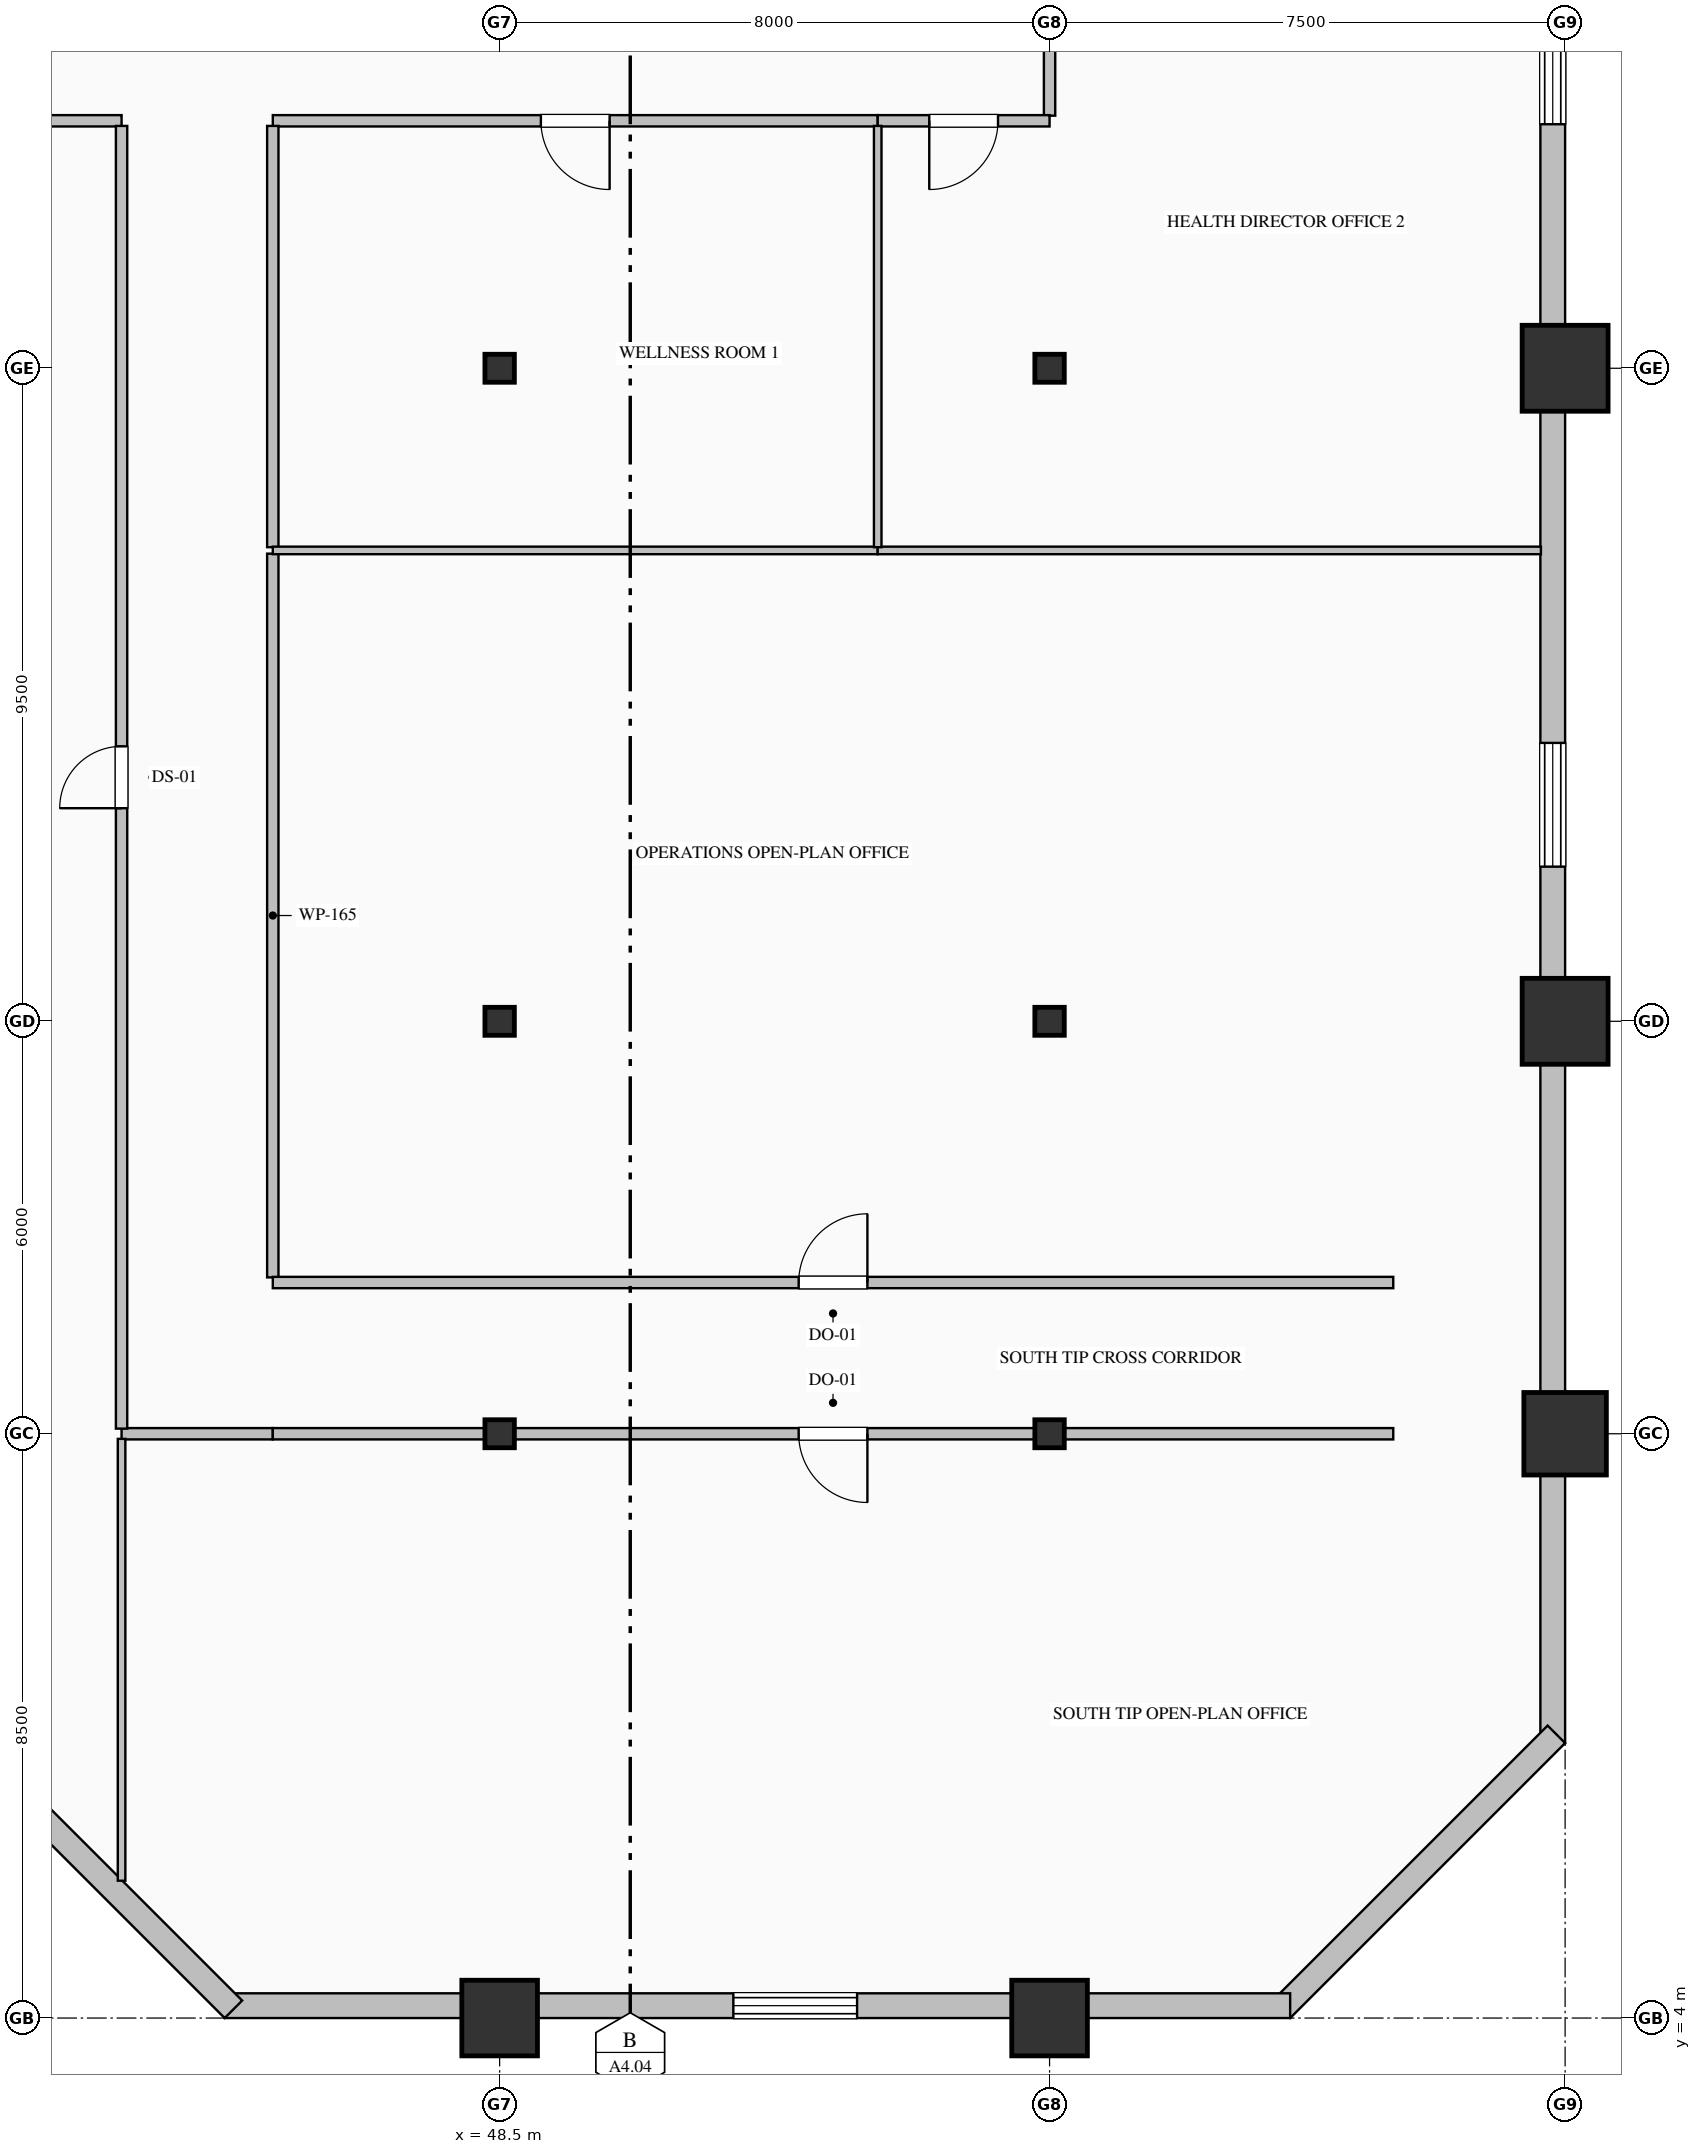
"""IFC4 building model, lengths in metres.
Left out: names, types, materials, properties, quantities, classifications, styles, units other than length and angle.
Written with IfcOpenShell. Run it as: python <this file> out.ifc"""

import sys

from ifc_helpers import new_model, si_unit, direction, frame, frame_2d, origin, origin_2d, place, context, subcontext, project, spatial, rectangle, hollow_rectangle, hollow_circle, i_section, extrude, element, fill, save


model = new_model("IFC4")
c1 = context("Model", 3, precision=1e-05, world=origin(), true_north=direction((0.0, 1.0)))
c2 = subcontext(c1, "Body", "Model", "MODEL_VIEW")
j1 = project(units=[si_unit("LENGTHUNIT", "METRE"), si_unit("PLANEANGLEUNIT", "RADIAN")], contexts=[c1])
p1 = place(None, origin())
s1 = spatial("IfcSite", under=j1, at=p1, CompositionType="ELEMENT")
p2 = place(p1, origin())
s2 = spatial("IfcBuilding", under=s1, at=p2, CompositionType="ELEMENT")
p3 = place(p2, frame((0.0, 0.0, 88.2)))
s3 = spatial("IfcBuildingStorey", under=s2, at=p3, CompositionType="ELEMENT", Elevation=88.2)
p4 = place(p3, frame((48.5, 4.0, 0.0), z_axis=(0.0, 0.0, 1.0), x_axis=(1.0, 0.0, 0.0)))
e1 = element("IfcColumn", 1, at=p4, inside=s3, PredefinedType="COLUMN", context=c2, shape_type="SweptSolid", body=[
    extrude(hollow_rectangle(XDim=1.1, YDim=1.1, WallThickness=0.04, at=origin_2d()), origin(), (0.0, 0.0, 1.0), 4.0),
])
for number, where, z_axis, x_axis in (
    (2, (48.5, 12.5, 0.0), (0.0, 0.0, 1.0), (1.0, 0.0, 0.0)),
    (3, (48.5, 18.5, 0.0), (0.0, 0.0, 1.0), (1.0, 0.0, 0.0)),
    (4, (48.5, 28.0, 0.0), (0.0, 0.0, 1.0), (1.0, 0.0, 0.0)),
):
    element("IfcColumn", number, at=place(p3, frame(where, z_axis=z_axis, x_axis=x_axis)), inside=s3, PredefinedType="COLUMN", context=c2, shape_type="SweptSolid", body=[
        extrude(i_section(OverallWidth=0.407, OverallDepth=0.428, WebThickness=0.02, FlangeThickness=0.035, FilletRadius=0.022, at=origin_2d()), origin(), (0.0, 0.0, 1.0), 4.0),
    ])
p5 = place(p3, frame((56.5, 4.0, 0.0), z_axis=(0.0, 0.0, 1.0), x_axis=(1.0, 0.0, 0.0)))
e5 = element("IfcColumn", 5, at=p5, inside=s3, PredefinedType="COLUMN", context=c2, shape_type="SweptSolid", body=[
    extrude(hollow_rectangle(XDim=1.1, YDim=1.1, WallThickness=0.04, at=origin_2d()), origin(), (0.0, 0.0, 1.0), 4.0),
])
for number, where, z_axis, x_axis in (
    (6, (56.5, 12.5, 0.0), (0.0, 0.0, 1.0), (1.0, 0.0, 0.0)),
    (7, (56.5, 18.5, 0.0), (0.0, 0.0, 1.0), (1.0, 0.0, 0.0)),
    (8, (56.5, 28.0, 0.0), (0.0, 0.0, 1.0), (1.0, 0.0, 0.0)),
):
    element("IfcColumn", number, at=place(p3, frame(where, z_axis=z_axis, x_axis=x_axis)), inside=s3, PredefinedType="COLUMN", context=c2, shape_type="SweptSolid", body=[
        extrude(i_section(OverallWidth=0.407, OverallDepth=0.428, WebThickness=0.02, FlangeThickness=0.035, FilletRadius=0.022, at=origin_2d()), origin(), (0.0, 0.0, 1.0), 4.0),
    ])
p6 = place(p3, frame((64.0, 12.5, 0.0), z_axis=(0.0, 0.0, 1.0), x_axis=(1.0, 0.0, 0.0)))
e9 = element("IfcColumn", 9, at=p6, inside=s3, PredefinedType="COLUMN", context=c2, shape_type="SweptSolid", body=[
    extrude(hollow_circle(Radius=0.6, WallThickness=0.04, at=origin_2d()), origin(), (0.0, 0.0, 1.0), 4.0),
])
for number, where, z_axis, x_axis in (
    (10, (64.0, 18.5, 0.0), (0.0, 0.0, 1.0), (1.0, 0.0, 0.0)),
    (11, (64.0, 28.0, 0.0), (0.0, 0.0, 1.0), (1.0, 0.0, 0.0)),
):
    element("IfcColumn", number, at=place(p3, frame(where, z_axis=z_axis, x_axis=x_axis)), inside=s3, PredefinedType="COLUMN", context=c2, shape_type="SweptSolid", body=[
        extrude(hollow_rectangle(XDim=1.25, YDim=1.25, WallThickness=0.045, at=origin_2d()), origin(), (0.0, 0.0, 1.0), 4.0),
    ])
p7 = place(p3, frame((63.82, 36.05, 0.0), z_axis=(0.0, 0.0, 1.0), x_axis=(0.0, -1.0, 0.0)))
e12 = element("IfcWall", 12, at=p7, inside=s3, PredefinedType="SOLIDWALL", context=c2, shape_type="SweptSolid", body=[
    extrude(rectangle(XDim=28.05, YDim=0.36, at=frame_2d((14.025, 0.0))), origin(), (0.0, 0.0, 1.0), 3.25),
])
p8 = place(p7, frame((2.7, 0.0, 0.85)))
e13 = element("IfcOpeningElement", 13, at=p8, cuts=e12, PredefinedType="OPENING", context=c2, shape_type="SweptSolid", body=[
    extrude(rectangle(XDim=1.8, YDim=2.05, at=frame_2d((0.9, 1.025))), frame((0.0, 0.19, 0.0), z_axis=(0.0, -1.0, 0.0), x_axis=(1.0, 0.0, 0.0)), (0.0, 0.0, 1.0), 0.38),
])
p9 = place(p7, frame((13.5, 0.0, 0.85)))
e14 = element("IfcOpeningElement", 14, at=p9, cuts=e12, PredefinedType="OPENING", context=c2, shape_type="SweptSolid", body=[
    extrude(rectangle(XDim=1.8, YDim=2.05, at=frame_2d((0.9, 1.025))), frame((0.0, 0.19, 0.0), z_axis=(0.0, -1.0, 0.0), x_axis=(1.0, 0.0, 0.0)), (0.0, 0.0, 1.0), 0.38),
])
p10 = place(p3, frame((63.873, 8.127, 0.0), z_axis=(0.0, 0.0, 1.0), x_axis=(-0.707106781187, -0.707106781187, 0.0)))
e15 = element("IfcWall", 15, at=p10, inside=s3, PredefinedType="SOLIDWALL", context=c2, shape_type="SweptSolid", body=[
    extrude(rectangle(XDim=5.657, YDim=0.36, at=frame_2d((2.828, 0.0))), origin(), (0.0, 0.0, 1.0), 3.75),
])
p11 = place(p3, frame((60.0, 4.18, 0.0), z_axis=(0.0, 0.0, 1.0), x_axis=(-1.0, 0.0, 0.0)))
e16 = element("IfcWall", 16, at=p11, inside=s3, PredefinedType="SOLIDWALL", context=c2, shape_type="SweptSolid", body=[
    extrude(rectangle(XDim=15.5, YDim=0.36, at=frame_2d((7.75, 0.0))), origin(), (0.0, 0.0, 1.0), 3.25),
])
p12 = place(p11, frame((6.3, 0.0, 0.85)))
e17 = element("IfcOpeningElement", 17, at=p12, cuts=e16, PredefinedType="OPENING", context=c2, shape_type="SweptSolid", body=[
    extrude(rectangle(XDim=1.8, YDim=2.05, at=frame_2d((0.9, 1.025))), frame((0.0, 0.19, 0.0), z_axis=(0.0, -1.0, 0.0), x_axis=(1.0, 0.0, 0.0)), (0.0, 0.0, 1.0), 0.38),
])
p13 = place(p3, frame((44.627, 4.127, 0.0), z_axis=(0.0, 0.0, 1.0), x_axis=(-0.707106781187, 0.707106781187, 0.0)))
e18 = element("IfcWall", 18, at=p13, inside=s3, PredefinedType="SOLIDWALL", context=c2, shape_type="SweptSolid", body=[
    extrude(rectangle(XDim=5.657, YDim=0.36, at=frame_2d((2.828, 0.0))), origin(), (0.0, 0.0, 1.0), 3.75),
])
p14 = place(p3, frame((54.0, 31.6, 0.0), z_axis=(0.0, 0.0, 1.0), x_axis=(-1.0, 0.0, 0.0)))
e19 = element("IfcWall", 19, at=p14, inside=s3, PredefinedType="PARTITIONING", context=c2, shape_type="SweptSolid", body=[
    extrude(rectangle(XDim=8.8, YDim=0.165, at=frame_2d((4.4, 0.0))), origin(), (0.0, 0.0, 1.0), 3.75),
])
p15 = place(p14, frame((3.9, 0.0, 0.0)))
e20 = element("IfcOpeningElement", 20, at=p15, cuts=e19, PredefinedType="OPENING", context=c2, shape_type="SweptSolid", body=[
    extrude(rectangle(XDim=1.0, YDim=2.15, at=frame_2d((0.5, 1.075))), frame((0.0, 0.093, 0.0), z_axis=(0.0, -1.0, 0.0), x_axis=(1.0, 0.0, 0.0)), (0.0, 0.0, 1.0), 0.185),
])
p16 = place(p3, frame((56.5, 33.726, 0.0), z_axis=(0.0, 0.0, 1.0), x_axis=(0.0, -1.0, 0.0)))
e21 = element("IfcWall", 21, at=p16, inside=s3, PredefinedType="PARTITIONING", context=c2, shape_type="SweptSolid", body=[
    extrude(rectangle(XDim=2.051, YDim=0.165, at=frame_2d((1.025, 0.0))), origin(), (0.0, 0.0, 1.0), 3.042),
])
p17 = place(p3, frame((56.5, 31.6, 0.0), z_axis=(0.0, 0.0, 1.0), x_axis=(-1.0, 0.0, 0.0)))
e22 = element("IfcWall", 22, at=p17, inside=s3, PredefinedType="PARTITIONING", context=c2, shape_type="SweptSolid", body=[
    extrude(rectangle(XDim=2.5, YDim=0.165, at=frame_2d((1.25, 0.0))), origin(), (0.0, 0.0, 1.0), 3.75),
])
p18 = place(p17, frame((0.75, 0.0, 0.0)))
e23 = element("IfcOpeningElement", 23, at=p18, cuts=e22, PredefinedType="OPENING", context=c2, shape_type="SweptSolid", body=[
    extrude(rectangle(XDim=1.0, YDim=2.15, at=frame_2d((0.5, 1.075))), frame((0.0, 0.093, 0.0), z_axis=(0.0, -1.0, 0.0), x_axis=(1.0, 0.0, 0.0)), (0.0, 0.0, 1.0), 0.185),
])
p19 = place(p3, frame((43.0, 31.6, 0.0), z_axis=(0.0, 0.0, 1.0), x_axis=(-1.0, 0.0, 0.0)))
e24 = element("IfcWall", 24, at=p19, inside=s3, PredefinedType="PARTITIONING", context=c2, shape_type="SweptSolid", body=[
    extrude(rectangle(XDim=2.5, YDim=0.165, at=frame_2d((1.25, 0.0))), origin(), (0.0, 0.0, 1.0), 3.75),
])
p20 = place(p3, frame((45.2, 12.5, 0.0), z_axis=(0.0, 0.0, 1.0), x_axis=(-1.0, 0.0, 0.0)))
e25 = element("IfcWall", 25, at=p20, inside=s3, PredefinedType="PARTITIONING", context=c2, shape_type="SweptSolid", body=[
    extrude(rectangle(XDim=2.2, YDim=0.165, at=frame_2d((1.1, 0.0))), origin(), (0.0, 0.0, 1.0), 3.042),
])
p21 = place(p3, frame((45.2, 25.303, 0.0), z_axis=(0.0, 0.0, 1.0), x_axis=(0.0, -1.0, 0.0)))
e26 = element("IfcWall", 26, at=p21, inside=s3, PredefinedType="PARTITIONING", context=c2, shape_type="SweptSolid", body=[
    extrude(rectangle(XDim=10.529, YDim=0.165, at=frame_2d((5.264, 0.0))), origin(), (0.0, 0.0, 1.0), 3.75),
])
p22 = place(p3, frame((45.2, 31.525, 0.0), z_axis=(0.0, 0.0, 1.0), x_axis=(0.0, -1.0, 0.0)))
e27 = element("IfcWall", 27, at=p22, inside=s3, PredefinedType="PARTITIONING", context=c2, shape_type="SweptSolid", body=[
    extrude(rectangle(XDim=6.128, YDim=0.165, at=frame_2d((3.064, 0.0))), origin(), (0.0, 0.0, 1.0), 3.75),
])
p23 = place(p3, frame((43.0, 12.574, 0.0), z_axis=(0.0, 0.0, 1.0), x_axis=(0.0, 1.0, 0.0)))
e28 = element("IfcWall", 28, at=p23, inside=s3, PredefinedType="PARTITIONING", context=c2, shape_type="SweptSolid", body=[
    extrude(rectangle(XDim=18.951, YDim=0.165, at=frame_2d((9.476, 0.0))), origin(), (0.0, 0.0, 1.0), 3.75),
])
p24 = place(p23, frame((9.025, 0.0, 0.0)))
e29 = element("IfcOpeningElement", 29, at=p24, cuts=e28, PredefinedType="OPENING", context=c2, shape_type="SweptSolid", body=[
    extrude(rectangle(XDim=0.9, YDim=2.15, at=frame_2d((0.45, 1.075))), frame((0.0, 0.093, 0.0), z_axis=(0.0, -1.0, 0.0), x_axis=(1.0, 0.0, 0.0)), (0.0, 0.0, 1.0), 0.185),
])
p25 = place(p3, frame((61.5, 12.5, 0.0), z_axis=(0.0, 0.0, 1.0), x_axis=(-1.0, 0.0, 0.0)))
e30 = element("IfcWall", 30, at=p25, inside=s3, PredefinedType="PARTITIONING", context=c2, shape_type="SweptSolid", body=[
    extrude(rectangle(XDim=16.3, YDim=0.165, at=frame_2d((8.15, 0.0))), origin(), (0.0, 0.0, 1.0), 3.042),
])
p26 = place(p25, frame((7.65, 0.0, 0.0)))
e31 = element("IfcOpeningElement", 31, at=p26, cuts=e30, PredefinedType="OPENING", context=c2, shape_type="SweptSolid", body=[
    extrude(rectangle(XDim=1.0, YDim=2.15, at=frame_2d((0.5, 1.075))), frame((0.0, 0.093, 0.0), z_axis=(0.0, -1.0, 0.0), x_axis=(1.0, 0.0, 0.0)), (0.0, 0.0, 1.0), 0.185),
])
p27 = place(p3, frame((45.2, 14.7, 0.0), z_axis=(0.0, 0.0, 1.0), x_axis=(1.0, 0.0, 0.0)))
e32 = element("IfcWall", 32, at=p27, inside=s3, PredefinedType="PARTITIONING", context=c2, shape_type="SweptSolid", body=[
    extrude(rectangle(XDim=16.3, YDim=0.165, at=frame_2d((8.15, 0.0))), origin(), (0.0, 0.0, 1.0), 3.75),
])
p28 = place(p27, frame((7.65, 0.0, 0.0)))
e33 = element("IfcOpeningElement", 33, at=p28, cuts=e32, PredefinedType="OPENING", context=c2, shape_type="SweptSolid", body=[
    extrude(rectangle(XDim=1.0, YDim=2.15, at=frame_2d((0.5, 1.075))), frame((0.0, 0.093, 0.0), z_axis=(0.0, -1.0, 0.0), x_axis=(1.0, 0.0, 0.0)), (0.0, 0.0, 1.0), 0.185),
])
p29 = place(p3, frame((43.0, 5.998, 0.0), z_axis=(0.0, 0.0, 1.0), x_axis=(0.0, 1.0, 0.0)))
e34 = element("IfcWall", 34, at=p29, inside=s3, PredefinedType="MOVABLE", context=c2, shape_type="SweptSolid", body=[
    extrude(rectangle(XDim=6.428, YDim=0.11, at=frame_2d((3.214, 0.0))), origin(), (0.0, 0.0, 1.0), 3.75),
])
p30 = place(p3, frame((45.2, 25.35, 0.0), z_axis=(0.0, 0.0, 1.0), x_axis=(1.0, 0.0, 0.0)))
e35 = element("IfcWall", 35, at=p30, inside=s3, PredefinedType="MOVABLE", context=c2, shape_type="SweptSolid", body=[
    extrude(rectangle(XDim=8.8, YDim=0.11, at=frame_2d((4.4, 0.0))), origin(), (0.0, 0.0, 1.0), 3.75),
])
p31 = place(p3, frame((54.0, 25.35, 0.0), z_axis=(0.0, 0.0, 1.0), x_axis=(1.0, 0.0, 0.0)))
e36 = element("IfcWall", 36, at=p31, inside=s3, PredefinedType="MOVABLE", context=c2, shape_type="SweptSolid", body=[
    extrude(rectangle(XDim=9.648, YDim=0.11, at=frame_2d((4.824, 0.0))), origin(), (0.0, 0.0, 1.0), 3.75),
])
p32 = place(p3, frame((54.0, 31.525, 0.0), z_axis=(0.0, 0.0, 1.0), x_axis=(0.0, -1.0, 0.0)))
e37 = element("IfcWall", 37, at=p32, inside=s3, PredefinedType="MOVABLE", context=c2, shape_type="SweptSolid", body=[
    extrude(rectangle(XDim=6.128, YDim=0.11, at=frame_2d((3.064, 0.0))), origin(), (0.0, 0.0, 1.0), 3.75),
])
p33 = place(p8, origin())
e38 = element("IfcWindow", 38, at=p33, inside=s3, PartitioningType="TRIPLE_PANEL_VERTICAL", PredefinedType="WINDOW", context=c2, shape_type="SweptSolid", body=[
    extrude(rectangle(XDim=1.8, YDim=2.05, at=frame_2d((0.9, 1.025))), frame((0.0, 0.15, 0.0), z_axis=(0.0, -1.0, 0.0), x_axis=(1.0, 0.0, 0.0)), (0.0, 0.0, 1.0), 0.06),
])
fill(e13, e38)
p34 = place(p9, origin())
e39 = element("IfcWindow", 39, at=p34, inside=s3, PartitioningType="TRIPLE_PANEL_VERTICAL", PredefinedType="WINDOW", context=c2, shape_type="SweptSolid", body=[
    extrude(rectangle(XDim=1.8, YDim=2.05, at=frame_2d((0.9, 1.025))), frame((0.0, 0.15, 0.0), z_axis=(0.0, -1.0, 0.0), x_axis=(1.0, 0.0, 0.0)), (0.0, 0.0, 1.0), 0.06),
])
fill(e14, e39)
p35 = place(p12, origin())
e40 = element("IfcWindow", 40, at=p35, inside=s3, PartitioningType="TRIPLE_PANEL_VERTICAL", PredefinedType="WINDOW", context=c2, shape_type="SweptSolid", body=[
    extrude(rectangle(XDim=1.8, YDim=2.05, at=frame_2d((0.9, 1.025))), frame((0.0, 0.15, 0.0), z_axis=(0.0, -1.0, 0.0), x_axis=(1.0, 0.0, 0.0)), (0.0, 0.0, 1.0), 0.06),
])
fill(e17, e40)
p36 = place(p26, origin())
e41 = element("IfcDoor", 41, at=p36, inside=s3, OperationType="SINGLE_SWING_LEFT", PredefinedType="DOOR", context=c2, shape_type="SweptSolid", body=[
    extrude(rectangle(XDim=1.0, YDim=2.15, at=frame_2d((0.5, 1.075))), frame((0.0, 0.025, 0.0), z_axis=(0.0, -1.0, 0.0), x_axis=(1.0, 0.0, 0.0)), (0.0, 0.0, 1.0), 0.05),
])
fill(e31, e41)
p37 = place(p28, origin())
e42 = element("IfcDoor", 42, at=p37, inside=s3, OperationType="SINGLE_SWING_RIGHT", PredefinedType="DOOR", context=c2, shape_type="SweptSolid", body=[
    extrude(rectangle(XDim=1.0, YDim=2.15, at=frame_2d((0.5, 1.075))), frame((0.0, 0.025, 0.0), z_axis=(0.0, -1.0, 0.0), x_axis=(1.0, 0.0, 0.0)), (0.0, 0.0, 1.0), 0.05),
])
fill(e33, e42)
p38 = place(p15, origin())
e43 = element("IfcDoor", 43, at=p38, inside=s3, OperationType="SINGLE_SWING_LEFT", PredefinedType="DOOR", context=c2, shape_type="SweptSolid", body=[
    extrude(rectangle(XDim=1.0, YDim=2.15, at=frame_2d((0.5, 1.075))), frame((0.0, 0.025, 0.0), z_axis=(0.0, -1.0, 0.0), x_axis=(1.0, 0.0, 0.0)), (0.0, 0.0, 1.0), 0.05),
])
fill(e20, e43)
p39 = place(p18, origin())
e44 = element("IfcDoor", 44, at=p39, inside=s3, OperationType="SINGLE_SWING_RIGHT", PredefinedType="DOOR", context=c2, shape_type="SweptSolid", body=[
    extrude(rectangle(XDim=1.0, YDim=2.15, at=frame_2d((0.5, 1.075))), frame((0.0, 0.025, 0.0), z_axis=(0.0, -1.0, 0.0), x_axis=(1.0, 0.0, 0.0)), (0.0, 0.0, 1.0), 0.05),
])
fill(e23, e44)
p40 = place(p24, origin())
e45 = element("IfcDoor", 45, at=p40, inside=s3, OperationType="SINGLE_SWING_LEFT", PredefinedType="DOOR", context=c2, shape_type="SweptSolid", body=[
    extrude(rectangle(XDim=0.9, YDim=2.15, at=frame_2d((0.45, 1.075))), frame((0.0, 0.025, 0.0), z_axis=(0.0, -1.0, 0.0), x_axis=(1.0, 0.0, 0.0)), (0.0, 0.0, 1.0), 0.05),
])
fill(e29, e45)
save(model, sys.argv[1])
